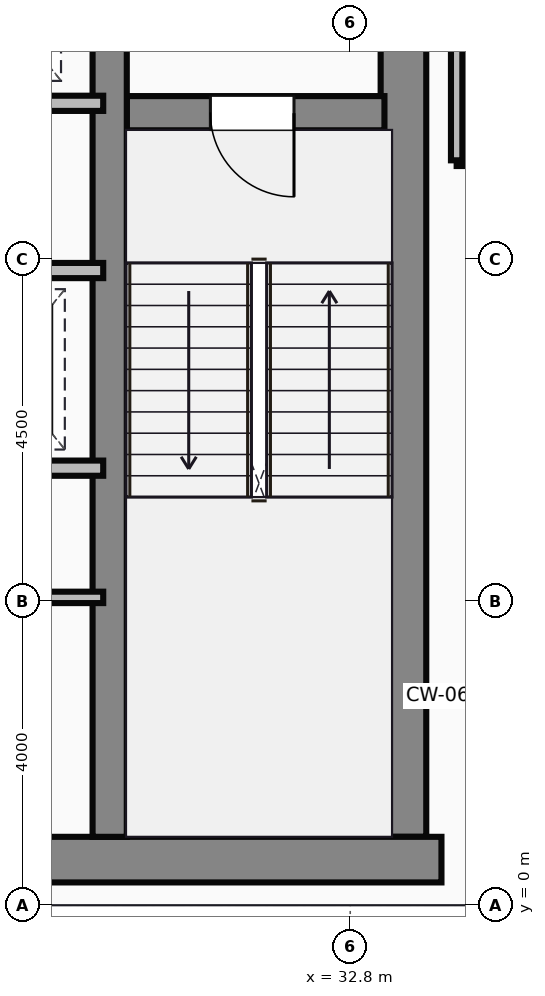
"""IFC4 building model, lengths in metres.
Left out: names, types, materials, properties, quantities, classifications, styles, units other than length and angle.
Written with IfcOpenShell. Run it as: python <this file> out.ifc"""

import sys

from ifc_helpers import new_model, si_unit, direction, frame, frame_2d, origin, place, context, subcontext, project, spatial, rectangle, extrude, source, transform, mapped, element, fill, save


model = new_model("IFC4")
c1 = context("Model", 3, precision=1e-05, world=origin(), true_north=direction((0.0, 1.0)))
c2 = subcontext(c1, "Body", "Model", "MODEL_VIEW")
j1 = project(units=[si_unit("LENGTHUNIT", "METRE"), si_unit("PLANEANGLEUNIT", "RADIAN")], contexts=[c1])
p1 = place(None, origin())
s1 = spatial("IfcSite", under=j1, at=p1, CompositionType="ELEMENT")
p2 = place(p1, origin())
s2 = spatial("IfcBuilding", under=s1, at=p2, CompositionType="ELEMENT")
p3 = place(p2, frame((0.0, 0.0, 288.0)))
s3 = spatial("IfcBuildingStorey", under=s2, at=p3, CompositionType="ELEMENT", Elevation=288.0)
m1 = source(origin(), c2, "Body", "SweptSolid", [
    extrude(rectangle(XDim=29.5, YDim=0.6, at=frame_2d((14.75, 0.0))), origin(), (0.0, 0.0, 1.0), 4.25),
])
p4 = place(p3, frame((4.5, 0.6, 0.0), z_axis=(0.0, 0.0, 1.0), x_axis=(1.0, 0.0, 0.0)))
e1 = element("IfcWall", 1, at=p4, inside=s3, PredefinedType="SHEAR", context=c2, shape_type="MappedRepresentation", body=[
    mapped(m1, transform((0.0, 0.0, 0.0))),
])
m2 = source(origin(), c2, "Body", "SweptSolid", [
    extrude(rectangle(XDim=13.1, YDim=0.6, at=frame_2d((6.55, 0.0))), origin(), (0.0, 0.0, 1.0), 4.25),
])
p5 = place(p3, frame((33.5, 0.9, 0.0), z_axis=(0.0, 0.0, 1.0), x_axis=(0.0, 1.0, 0.0)))
e2 = element("IfcWall", 2, at=p5, inside=s3, PredefinedType="SHEAR", context=c2, shape_type="MappedRepresentation", body=[
    mapped(m2, transform((0.0, 0.0, 0.0))),
])
m3 = source(origin(), c2, "Body", "SweptSolid", [
    extrude(rectangle(XDim=12.5, YDim=0.45, at=frame_2d((6.25, 0.0))), origin(), (0.0, 0.0, 1.0), 4.25),
])
p6 = place(p3, frame((29.635, 0.9, 0.0), z_axis=(0.0, 0.0, 1.0), x_axis=(0.0, 1.0, 0.0)))
e3 = element("IfcWall", 3, at=p6, inside=s3, PredefinedType="SHEAR", context=c2, shape_type="MappedRepresentation", body=[
    mapped(m3, transform((0.0, 0.0, 0.0))),
])
m4 = source(origin(), c2, "Body", "SweptSolid", [
    extrude(rectangle(XDim=3.39, YDim=0.45, at=frame_2d((1.695, 0.0))), origin(), (0.0, 0.0, 1.0), 4.25),
])
p7 = place(p3, frame((29.86, 10.42, 0.0), z_axis=(0.0, 0.0, 1.0), x_axis=(1.0, 0.0, 0.0)))
e4 = element("IfcWall", 4, at=p7, inside=s3, PredefinedType="SHEAR", context=c2, shape_type="MappedRepresentation", body=[
    mapped(m4, transform((0.0, 0.0, 0.0))),
])
p8 = place(p7, frame((1.1, 0.0, 0.0)))
e5 = element("IfcOpeningElement", 5, at=p8, cuts=e4, PredefinedType="OPENING", context=c2, shape_type="SweptSolid", body=[
    extrude(rectangle(XDim=1.1, YDim=2.15, at=frame_2d((0.55, 1.075))), frame((0.0, 0.235, 0.0), z_axis=(0.0, -1.0, 0.0), x_axis=(1.0, 0.0, 0.0)), (0.0, 0.0, 1.0), 0.47),
])
m5 = source(origin(), c2, "Body", "SweptSolid", [
    extrude(rectangle(XDim=8.8, YDim=0.2, at=frame_2d((4.4, 0.0))), origin(), (0.0, 0.0, 1.0), 3.85),
])
p9 = place(p3, frame((20.75, 10.55, 0.0), z_axis=(0.0, 0.0, 1.0), x_axis=(1.0, 0.0, 0.0)))
e6 = element("IfcWall", 6, at=p9, inside=s3, PredefinedType="PARTITIONING", context=c2, shape_type="MappedRepresentation", body=[
    mapped(m5, transform((0.0, 0.0, 0.0))),
])
p10 = place(p9, frame((0.5, 0.0, 0.0)))
e7 = element("IfcOpeningElement", 7, at=p10, cuts=e6, PredefinedType="OPENING", context=c2, shape_type="SweptSolid", body=[
    extrude(rectangle(XDim=1.05, YDim=2.15, at=frame_2d((0.525, 1.075))), frame((0.0, 0.11, 0.0), z_axis=(0.0, -1.0, 0.0), x_axis=(1.0, 0.0, 0.0)), (0.0, 0.0, 1.0), 0.22),
])
p11 = place(p9, frame((2.6, 0.0, 0.0)))
e8 = element("IfcOpeningElement", 8, at=p11, cuts=e6, PredefinedType="OPENING", context=c2, shape_type="SweptSolid", body=[
    extrude(rectangle(XDim=1.05, YDim=2.15, at=frame_2d((0.525, 1.075))), frame((0.0, 0.11, 0.0), z_axis=(0.0, -1.0, 0.0), x_axis=(1.0, 0.0, 0.0)), (0.0, 0.0, 1.0), 0.22),
])
p12 = place(p9, frame((4.7, 0.0, 0.0)))
e9 = element("IfcOpeningElement", 9, at=p12, cuts=e6, PredefinedType="OPENING", context=c2, shape_type="SweptSolid", body=[
    extrude(rectangle(XDim=1.05, YDim=2.15, at=frame_2d((0.525, 1.075))), frame((0.0, 0.11, 0.0), z_axis=(0.0, -1.0, 0.0), x_axis=(1.0, 0.0, 0.0)), (0.0, 0.0, 1.0), 0.22),
])
p13 = place(p9, frame((6.8, 0.0, 0.0)))
e10 = element("IfcOpeningElement", 10, at=p13, cuts=e6, PredefinedType="OPENING", context=c2, shape_type="SweptSolid", body=[
    extrude(rectangle(XDim=1.05, YDim=2.15, at=frame_2d((0.525, 1.075))), frame((0.0, 0.11, 0.0), z_axis=(0.0, -1.0, 0.0), x_axis=(1.0, 0.0, 0.0)), (0.0, 0.0, 1.0), 0.22),
])
m6 = source(origin(), c2, "Body", "SweptSolid", [
    extrude(rectangle(XDim=4.55, YDim=0.2, at=frame_2d((2.275, 0.0))), origin(), (0.0, 0.0, 1.0), 3.85),
])
p14 = place(p3, frame((25.0, 8.35, 0.0), z_axis=(0.0, 0.0, 1.0), x_axis=(1.0, 0.0, 0.0)))
e11 = element("IfcWall", 11, at=p14, inside=s3, PredefinedType="PARTITIONING", context=c2, shape_type="MappedRepresentation", body=[
    mapped(m6, transform((0.0, 0.0, 0.0))),
])
p15 = place(p14, frame((0.5, 0.0, 0.0)))
e12 = element("IfcOpeningElement", 12, at=p15, cuts=e11, PredefinedType="OPENING", context=c2, shape_type="SweptSolid", body=[
    extrude(rectangle(XDim=1.05, YDim=2.15, at=frame_2d((0.525, 1.075))), frame((0.0, 0.11, 0.0), z_axis=(0.0, -1.0, 0.0), x_axis=(1.0, 0.0, 0.0)), (0.0, 0.0, 1.0), 0.22),
])
p16 = place(p14, frame((2.6, 0.0, 0.0)))
e13 = element("IfcOpeningElement", 13, at=p16, cuts=e11, PredefinedType="OPENING", context=c2, shape_type="SweptSolid", body=[
    extrude(rectangle(XDim=1.05, YDim=2.15, at=frame_2d((0.525, 1.075))), frame((0.0, 0.11, 0.0), z_axis=(0.0, -1.0, 0.0), x_axis=(1.0, 0.0, 0.0)), (0.0, 0.0, 1.0), 0.22),
])
p17 = place(p3, frame((25.0, 5.75, 0.0), z_axis=(0.0, 0.0, 1.0), x_axis=(1.0, 0.0, 0.0)))
e14 = element("IfcWall", 14, at=p17, inside=s3, PredefinedType="PARTITIONING", context=c2, shape_type="MappedRepresentation", body=[
    mapped(m6, transform((0.0, 0.0, 0.0))),
])
m7 = source(origin(), c2, "Body", "SweptSolid", [
    extrude(rectangle(XDim=4.55, YDim=0.15, at=frame_2d((2.275, 0.0))), origin(), (0.0, 0.0, 1.0), 3.85),
])
p18 = place(p3, frame((25.0, 4.05, 0.0), z_axis=(0.0, 0.0, 1.0), x_axis=(1.0, 0.0, 0.0)))
e15 = element("IfcWall", 15, at=p18, inside=s3, PredefinedType="PARTITIONING", context=c2, shape_type="MappedRepresentation", body=[
    mapped(m7, transform((0.0, 0.0, 0.0))),
])
m8 = source(origin(), c2, "Body", "SweptSolid", [
    extrude(rectangle(XDim=4.8, YDim=0.15, at=frame_2d((2.4, 0.0))), origin(), (0.0, 0.0, 1.0), 3.85),
])
p19 = place(p3, frame((34.2, 9.8, 0.0), z_axis=(0.0, 0.0, 1.0), x_axis=(1.0, 0.0, 0.0)))
e16 = element("IfcWall", 16, at=p19, inside=s3, PredefinedType="PARTITIONING", context=c2, shape_type="MappedRepresentation", body=[
    mapped(m8, transform((0.0, 0.0, 0.0))),
])
m9 = source(origin(), c2, "Body", "SweptSolid", [
    extrude(rectangle(XDim=4.18, YDim=0.15, at=frame_2d((2.09, 0.0))), origin(), (0.0, 0.0, 1.0), 3.85),
])
p20 = place(p3, frame((34.2, 9.8, 0.0), z_axis=(0.0, 0.0, 1.0), x_axis=(0.0, 1.0, 0.0)))
e17 = element("IfcWall", 17, at=p20, inside=s3, PredefinedType="PARTITIONING", context=c2, shape_type="MappedRepresentation", body=[
    mapped(m9, transform((0.0, 0.0, 0.0))),
])
m10 = source(origin(), c2, "Body", "SweptSolid", [
    extrude(rectangle(XDim=1.1, YDim=2.15, at=frame_2d((0.55, 1.075))), frame((0.0, 0.025, 0.0), z_axis=(0.0, -1.0, 0.0), x_axis=(1.0, 0.0, 0.0)), (0.0, 0.0, 1.0), 0.05),
])
p21 = place(p8, frame((1.1, 0.0, 0.0), z_axis=(0.0, 0.0, 1.0), x_axis=(-1.0, 0.0, 0.0)))
e18 = element("IfcDoor", 18, at=p21, inside=s3, OperationType="SINGLE_SWING_RIGHT", PredefinedType="DOOR", context=c2, shape_type="MappedRepresentation", body=[
    mapped(m10, transform((0.0, 0.0, 0.0))),
])
fill(e5, e18)
save(model, sys.argv[1])
